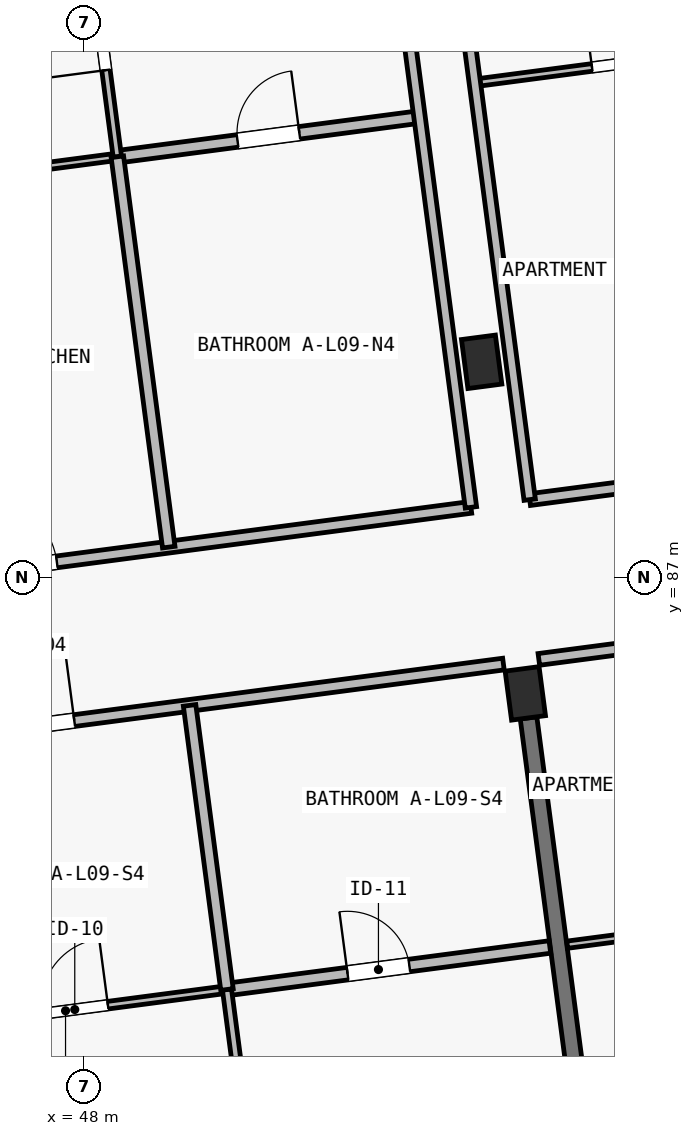
"""IFC4 building model, lengths in metres.
Left out: names, types, materials, properties, quantities, classifications, styles, units other than length and angle.
Written with IfcOpenShell. Run it as: python <this file> out.ifc"""

import sys

from ifc_helpers import new_model, si_unit, direction, frame, frame_2d, origin, origin_2d, place, context, subcontext, project, spatial, rectangle, extrude, element, fill, save


model = new_model("IFC4")
c1 = context("Model", 3, precision=1e-05, world=origin(), true_north=direction((0.0, 1.0)))
c2 = subcontext(c1, "Body", "Model", "MODEL_VIEW")
j1 = project(units=[si_unit("LENGTHUNIT", "METRE"), si_unit("PLANEANGLEUNIT", "RADIAN")], contexts=[c1])
p1 = place(None, origin())
s1 = spatial("IfcSite", under=j1, at=p1, CompositionType="ELEMENT")
p2 = place(p1, origin())
s2 = spatial("IfcBuilding", under=s1, at=p2, CompositionType="ELEMENT")
p3 = place(p2, frame((0.0, 0.0, 31.15)))
s3 = spatial("IfcBuildingStorey", under=s2, at=p3, CompositionType="ELEMENT", Elevation=31.15)
for number, where, z_axis, x_axis in (
    (1, (53.805, 85.476, 0.0), (0.0, 0.0, 1.0), (0.991, 0.131, 0.0)),
    (2, (53.231, 89.839, 0.0), (0.0, 0.0, 1.0), (0.991, 0.131, 0.0)),
):
    element("IfcColumn", number, at=place(p3, frame(where, z_axis=z_axis, x_axis=x_axis)), inside=s3, PredefinedType="COLUMN", context=c2, shape_type="SweptSolid", body=[
        extrude(rectangle(XDim=0.45, YDim=0.65, at=origin_2d()), origin(), (0.0, 0.0, 1.0), 3.25),
    ])
p4 = place(p3, frame((54.781, 78.065, 0.0), z_axis=(0.0, 0.0, 1.0), x_axis=(-0.130537539388, 0.991443367425, 0.0)))
e3 = element("IfcWall", 3, at=p4, inside=s3, PredefinedType="SHEAR", context=c2, shape_type="SweptSolid", body=[
    extrude(rectangle(XDim=7.15, YDim=0.22, at=frame_2d((3.575, 0.0))), origin(), (0.0, 0.0, 1.0), 2.5),
])
p5 = place(p3, frame((45.259, 84.775, 0.0), z_axis=(0.0, 0.0, 1.0), x_axis=(0.991446412738, 0.130514407897, 0.0)))
e4 = element("IfcWall", 4, at=p5, inside=s3, PredefinedType="PARTITIONING", context=c2, shape_type="SweptSolid", body=[
    extrude(rectangle(XDim=8.33, YDim=0.155, at=frame_2d((4.165, 0.0))), origin(), (0.0, 0.0, 1.0), 2.97),
])
p6 = place(p5, frame((1.655, 0.0, 0.0)))
e5 = element("IfcOpeningElement", 5, at=p6, cuts=e4, PredefinedType="OPENING", context=c2, shape_type="SweptSolid", body=[
    extrude(rectangle(XDim=0.98, YDim=2.15, at=frame_2d((0.49, 1.075))), frame((0.0, 0.093, 0.0), z_axis=(0.0, -1.0, 0.0), x_axis=(1.0, 0.0, 0.0)), (0.0, 0.0, 1.0), 0.185),
])
p7 = place(p3, frame((45.632, 81.021, 0.0), z_axis=(0.0, 0.0, 1.0), x_axis=(0.991444014242, 0.130532626667, 0.0)))
e6 = element("IfcWall", 6, at=p7, inside=s3, PredefinedType="PARTITIONING", context=c2, shape_type="SweptSolid", body=[
    extrude(rectangle(XDim=4.285, YDim=0.1, at=frame_2d((2.143, 0.0))), origin(), (0.0, 0.0, 1.0), 2.97),
])
p8 = place(p7, frame((1.825, 0.0, 0.0)))
e7 = element("IfcOpeningElement", 7, at=p8, cuts=e6, PredefinedType="OPENING", context=c2, shape_type="SweptSolid", body=[
    extrude(rectangle(XDim=0.88, YDim=2.1, at=frame_2d((0.44, 1.05))), frame((0.0, 0.065, 0.0), z_axis=(0.0, -1.0, 0.0), x_axis=(1.0, 0.0, 0.0)), (0.0, 0.0, 1.0), 0.13),
])
p9 = place(p3, frame((49.88, 81.581, 0.0), z_axis=(0.0, 0.0, 1.0), x_axis=(0.991444014242, 0.130532626667, 0.0)))
e8 = element("IfcWall", 8, at=p9, inside=s3, PredefinedType="PLUMBINGWALL", context=c2, shape_type="SweptSolid", body=[
    extrude(rectangle(XDim=4.285, YDim=0.165, at=frame_2d((2.143, 0.0))), origin(), (0.0, 0.0, 1.0), 2.97),
])
p10 = place(p9, frame((1.6, 0.0, 0.0)))
e9 = element("IfcOpeningElement", 9, at=p10, cuts=e8, PredefinedType="OPENING", context=c2, shape_type="SweptSolid", body=[
    extrude(rectangle(XDim=0.82, YDim=2.08, at=frame_2d((0.41, 1.04))), frame((0.0, 0.097, 0.0), z_axis=(0.0, -1.0, 0.0), x_axis=(1.0, 0.0, 0.0)), (0.0, 0.0, 1.0), 0.195),
])
p11 = place(p3, frame((50.512, 76.782, 0.0), z_axis=(0.0, 0.0, 1.0), x_axis=(-0.130544545786, 0.991442444908, 0.0)))
e10 = element("IfcWall", 10, at=p11, inside=s3, PredefinedType="PARTITIONING", context=c2, shape_type="SweptSolid", body=[
    extrude(rectangle(XDim=4.84, YDim=0.12, at=frame_2d((2.42, 0.0))), origin(), (0.0, 0.0, 1.0), 2.97),
])
p12 = place(p11, frame((1.35, 0.0, 0.0)))
e11 = element("IfcOpeningElement", 11, at=p12, cuts=e10, PredefinedType="OPENING", context=c2, shape_type="SweptSolid", body=[
    extrude(rectangle(XDim=0.9, YDim=2.1, at=frame_2d((0.45, 1.05))), frame((0.0, 0.075, 0.0), z_axis=(0.0, -1.0, 0.0), x_axis=(1.0, 0.0, 0.0)), (0.0, 0.0, 1.0), 0.15),
])
p13 = place(p3, frame((49.88, 81.581, 0.0), z_axis=(0.0, 0.0, 1.0), x_axis=(-0.130551670646, 0.991441506742, 0.0)))
e12 = element("IfcWall", 12, at=p13, inside=s3, PredefinedType="PLUMBINGWALL", context=c2, shape_type="SweptSolid", body=[
    extrude(rectangle(XDim=3.77, YDim=0.165, at=frame_2d((1.885, 0.0))), origin(), (0.0, 0.0, 1.0), 2.97),
])
p14 = place(p3, frame((53.984, 85.924, 0.0), z_axis=(0.0, 0.0, 1.0), x_axis=(0.991445946609, 0.130517948779, 0.0)))
e13 = element("IfcWall", 13, at=p14, inside=s3, PredefinedType="PARTITIONING", context=c2, shape_type="SweptSolid", body=[
    extrude(rectangle(XDim=8.96, YDim=0.155, at=frame_2d((4.48, 0.0))), origin(), (0.0, 0.0, 1.0), 2.97),
])
p15 = place(p14, frame((1.655, 0.0, 0.0)))
e14 = element("IfcOpeningElement", 14, at=p15, cuts=e13, PredefinedType="OPENING", context=c2, shape_type="SweptSolid", body=[
    extrude(rectangle(XDim=1.02, YDim=2.2, at=frame_2d((0.51, 1.1))), frame((0.0, 0.093, 0.0), z_axis=(0.0, -1.0, 0.0), x_axis=(1.0, 0.0, 0.0)), (0.0, 0.0, 1.0), 0.185),
])
p16 = place(p3, frame((54.357, 82.17, 0.0), z_axis=(0.0, 0.0, 1.0), x_axis=(0.991444014242, 0.130532626667, 0.0)))
e15 = element("IfcWall", 15, at=p16, inside=s3, PredefinedType="PARTITIONING", context=c2, shape_type="SweptSolid", body=[
    extrude(rectangle(XDim=4.285, YDim=0.095, at=frame_2d((2.143, 0.0))), origin(), (0.0, 0.0, 1.0), 2.97),
])
p17 = place(p16, frame((1.825, 0.0, 0.0)))
e16 = element("IfcOpeningElement", 16, at=p17, cuts=e15, PredefinedType="OPENING", context=c2, shape_type="SweptSolid", body=[
    extrude(rectangle(XDim=0.9, YDim=2.1, at=frame_2d((0.45, 1.05))), frame((0.0, 0.062, 0.0), z_axis=(0.0, -1.0, 0.0), x_axis=(1.0, 0.0, 0.0)), (0.0, 0.0, 1.0), 0.125),
])
p18 = place(p3, frame((45.138, 86.877, 0.0), z_axis=(0.0, 0.0, 1.0), x_axis=(0.991444034844, 0.130532470184, 0.0)))
e17 = element("IfcWall", 17, at=p18, inside=s3, PredefinedType="PARTITIONING", context=c2, shape_type="SweptSolid", body=[
    extrude(rectangle(XDim=8.02, YDim=0.155, at=frame_2d((4.01, 0.0))), origin(), (0.0, 0.0, 1.0), 2.97),
])
p19 = place(p18, frame((1.505, 0.0, 0.0)))
e18 = element("IfcOpeningElement", 18, at=p19, cuts=e17, PredefinedType="OPENING", context=c2, shape_type="SweptSolid", body=[
    extrude(rectangle(XDim=1.02, YDim=2.2, at=frame_2d((0.51, 1.1))), frame((0.0, 0.093, 0.0), z_axis=(0.0, -1.0, 0.0), x_axis=(1.0, 0.0, 0.0)), (0.0, 0.0, 1.0), 0.185),
])
p20 = place(p3, frame((44.462, 92.013, 0.0), z_axis=(0.0, 0.0, 1.0), x_axis=(0.991451394038, 0.130476562111, 0.0)))
e19 = element("IfcWall", 19, at=p20, inside=s3, PredefinedType="PARTITIONING", context=c2, shape_type="SweptSolid", body=[
    extrude(rectangle(XDim=4.01, YDim=0.095, at=frame_2d((2.005, 0.0))), origin(), (0.0, 0.0, 1.0), 2.97),
])
p21 = place(p20, frame((1.555, 0.0, 0.0)))
e20 = element("IfcOpeningElement", 20, at=p21, cuts=e19, PredefinedType="OPENING", context=c2, shape_type="SweptSolid", body=[
    extrude(rectangle(XDim=0.9, YDim=2.1, at=frame_2d((0.45, 1.05))), frame((0.0, 0.062, 0.0), z_axis=(0.0, -1.0, 0.0), x_axis=(1.0, 0.0, 0.0)), (0.0, 0.0, 1.0), 0.125),
])
p22 = place(p3, frame((48.438, 92.536, 0.0), z_axis=(0.0, 0.0, 1.0), x_axis=(0.991444553502, 0.130528530716, 0.0)))
e21 = element("IfcWall", 21, at=p22, inside=s3, PredefinedType="PLUMBINGWALL", context=c2, shape_type="SweptSolid", body=[
    extrude(rectangle(XDim=4.01, YDim=0.165, at=frame_2d((2.005, 0.0))), origin(), (0.0, 0.0, 1.0), 2.97),
])
p23 = place(p22, frame((1.595, 0.0, 0.0)))
e22 = element("IfcOpeningElement", 22, at=p23, cuts=e21, PredefinedType="OPENING", context=c2, shape_type="SweptSolid", body=[
    extrude(rectangle(XDim=0.82, YDim=2.08, at=frame_2d((0.41, 1.04))), frame((0.0, 0.097, 0.0), z_axis=(0.0, -1.0, 0.0), x_axis=(1.0, 0.0, 0.0)), (0.0, 0.0, 1.0), 0.195),
])
p24 = place(p3, frame((48.438, 92.536, 0.0), z_axis=(0.0, 0.0, 1.0), x_axis=(-0.130508755558, 0.991447156798, 0.0)))
e23 = element("IfcWall", 23, at=p24, inside=s3, PredefinedType="PARTITIONING", context=c2, shape_type="SweptSolid", body=[
    extrude(rectangle(XDim=4.89, YDim=0.11, at=frame_2d((2.445, 0.0))), origin(), (0.0, 0.0, 1.0), 2.97),
])
p25 = place(p24, frame((1.15, 0.0, 0.0)))
e24 = element("IfcOpeningElement", 24, at=p25, cuts=e23, PredefinedType="OPENING", context=c2, shape_type="SweptSolid", body=[
    extrude(rectangle(XDim=0.9, YDim=2.1, at=frame_2d((0.45, 1.05))), frame((0.0, 0.07, 0.0), z_axis=(0.0, -1.0, 0.0), x_axis=(1.0, 0.0, 0.0)), (0.0, 0.0, 1.0), 0.14),
])
p26 = place(p3, frame((49.114, 87.401, 0.0), z_axis=(0.0, 0.0, 1.0), x_axis=(-0.130558146496, 0.99144065399, 0.0)))
e25 = element("IfcWall", 25, at=p26, inside=s3, PredefinedType="PLUMBINGWALL", context=c2, shape_type="SweptSolid", body=[
    extrude(rectangle(XDim=5.18, YDim=0.165, at=frame_2d((2.59, 0.0))), origin(), (0.0, 0.0, 1.0), 2.97),
])
p27 = place(p3, frame((53.09, 87.924, 0.0), z_axis=(0.0, 0.0, 1.0), x_axis=(-0.130534161944, 0.991443812107, 0.0)))
e26 = element("IfcWall", 26, at=p27, inside=s3, PredefinedType="PARTITIONING", context=c2, shape_type="SweptSolid", body=[
    extrude(rectangle(XDim=10.07, YDim=0.15, at=frame_2d((5.035, 0.0))), origin(), (0.0, 0.0, 1.0), 2.97),
])
p28 = place(p3, frame((53.863, 88.026, 0.0), z_axis=(0.0, 0.0, 1.0), x_axis=(0.991447973994, 0.130502547346, 0.0)))
e27 = element("IfcWall", 27, at=p28, inside=s3, PredefinedType="PARTITIONING", context=c2, shape_type="SweptSolid", body=[
    extrude(rectangle(XDim=8.02, YDim=0.155, at=frame_2d((4.01, 0.0))), origin(), (0.0, 0.0, 1.0), 2.97),
])
p29 = place(p28, frame((1.505, 0.0, 0.0)))
e28 = element("IfcOpeningElement", 28, at=p29, cuts=e27, PredefinedType="OPENING", context=c2, shape_type="SweptSolid", body=[
    extrude(rectangle(XDim=0.98, YDim=2.15, at=frame_2d((0.49, 1.075))), frame((0.0, 0.093, 0.0), z_axis=(0.0, -1.0, 0.0), x_axis=(1.0, 0.0, 0.0)), (0.0, 0.0, 1.0), 0.185),
])
p30 = place(p3, frame((53.141, 93.509, 0.0), z_axis=(0.0, 0.0, 1.0), x_axis=(0.991444553502, 0.130528530716, 0.0)))
e29 = element("IfcWall", 29, at=p30, inside=s3, PredefinedType="PARTITIONING", context=c2, shape_type="SweptSolid", body=[
    extrude(rectangle(XDim=4.01, YDim=0.1, at=frame_2d((2.005, 0.0))), origin(), (0.0, 0.0, 1.0), 2.97),
])
p31 = place(p30, frame((1.555, 0.0, 0.0)))
e30 = element("IfcOpeningElement", 30, at=p31, cuts=e29, PredefinedType="OPENING", context=c2, shape_type="SweptSolid", body=[
    extrude(rectangle(XDim=0.88, YDim=2.1, at=frame_2d((0.44, 1.05))), frame((0.0, 0.065, 0.0), z_axis=(0.0, -1.0, 0.0), x_axis=(1.0, 0.0, 0.0)), (0.0, 0.0, 1.0), 0.13),
])
p32 = place(p3, frame((53.863, 88.026, 0.0), z_axis=(0.0, 0.0, 1.0), x_axis=(-0.130534161944, 0.991443812107, 0.0)))
e31 = element("IfcWall", 31, at=p32, inside=s3, PredefinedType="PARTITIONING", context=c2, shape_type="SweptSolid", body=[
    extrude(rectangle(XDim=10.07, YDim=0.15, at=frame_2d((5.035, 0.0))), origin(), (0.0, 0.0, 1.0), 2.97),
])
p33 = place(p6, origin())
e32 = element("IfcDoor", 32, at=p33, inside=s3, OperationType="SINGLE_SWING_RIGHT", PredefinedType="DOOR", context=c2, shape_type="SweptSolid", body=[
    extrude(rectangle(XDim=0.98, YDim=2.15, at=frame_2d((0.49, 1.075))), frame((0.0, 0.025, 0.0), z_axis=(0.0, -1.0, 0.0), x_axis=(1.0, 0.0, 0.0)), (0.0, 0.0, 1.0), 0.05),
])
fill(e5, e32)
p34 = place(p8, origin())
e33 = element("IfcDoor", 33, at=p34, inside=s3, OperationType="SINGLE_SWING_RIGHT", PredefinedType="DOOR", context=c2, shape_type="SweptSolid", body=[
    extrude(rectangle(XDim=0.88, YDim=2.1, at=frame_2d((0.44, 1.05))), frame((0.0, 0.025, 0.0), z_axis=(0.0, -1.0, 0.0), x_axis=(1.0, 0.0, 0.0)), (0.0, 0.0, 1.0), 0.05),
])
fill(e7, e33)
p35 = place(p10, origin())
e34 = element("IfcDoor", 34, at=p35, inside=s3, OperationType="SINGLE_SWING_LEFT", PredefinedType="DOOR", context=c2, shape_type="SweptSolid", body=[
    extrude(rectangle(XDim=0.82, YDim=2.08, at=frame_2d((0.41, 1.04))), frame((0.0, 0.025, 0.0), z_axis=(0.0, -1.0, 0.0), x_axis=(1.0, 0.0, 0.0)), (0.0, 0.0, 1.0), 0.05),
])
fill(e9, e34)
p36 = place(p19, origin())
e35 = element("IfcDoor", 35, at=p36, inside=s3, OperationType="SINGLE_SWING_LEFT", PredefinedType="DOOR", context=c2, shape_type="SweptSolid", body=[
    extrude(rectangle(XDim=1.02, YDim=2.2, at=frame_2d((0.51, 1.1))), frame((0.0, 0.025, 0.0), z_axis=(0.0, -1.0, 0.0), x_axis=(1.0, 0.0, 0.0)), (0.0, 0.0, 1.0), 0.05),
])
fill(e18, e35)
p37 = place(p23, origin())
e36 = element("IfcDoor", 36, at=p37, inside=s3, OperationType="SINGLE_SWING_RIGHT", PredefinedType="DOOR", context=c2, shape_type="SweptSolid", body=[
    extrude(rectangle(XDim=0.82, YDim=2.08, at=frame_2d((0.41, 1.04))), frame((0.0, 0.025, 0.0), z_axis=(0.0, -1.0, 0.0), x_axis=(1.0, 0.0, 0.0)), (0.0, 0.0, 1.0), 0.05),
])
fill(e22, e36)
p38 = place(p25, origin())
e37 = element("IfcDoor", 37, at=p38, inside=s3, OperationType="SINGLE_SWING_LEFT", PredefinedType="DOOR", context=c2, shape_type="SweptSolid", body=[
    extrude(rectangle(XDim=0.9, YDim=2.1, at=frame_2d((0.45, 1.05))), frame((0.0, 0.025, 0.0), z_axis=(0.0, -1.0, 0.0), x_axis=(1.0, 0.0, 0.0)), (0.0, 0.0, 1.0), 0.05),
])
fill(e24, e37)
p39 = place(p31, origin())
e38 = element("IfcDoor", 38, at=p39, inside=s3, OperationType="SINGLE_SWING_LEFT", PredefinedType="DOOR", context=c2, shape_type="SweptSolid", body=[
    extrude(rectangle(XDim=0.88, YDim=2.1, at=frame_2d((0.44, 1.05))), frame((0.0, 0.025, 0.0), z_axis=(0.0, -1.0, 0.0), x_axis=(1.0, 0.0, 0.0)), (0.0, 0.0, 1.0), 0.05),
])
fill(e30, e38)
save(model, sys.argv[1])
